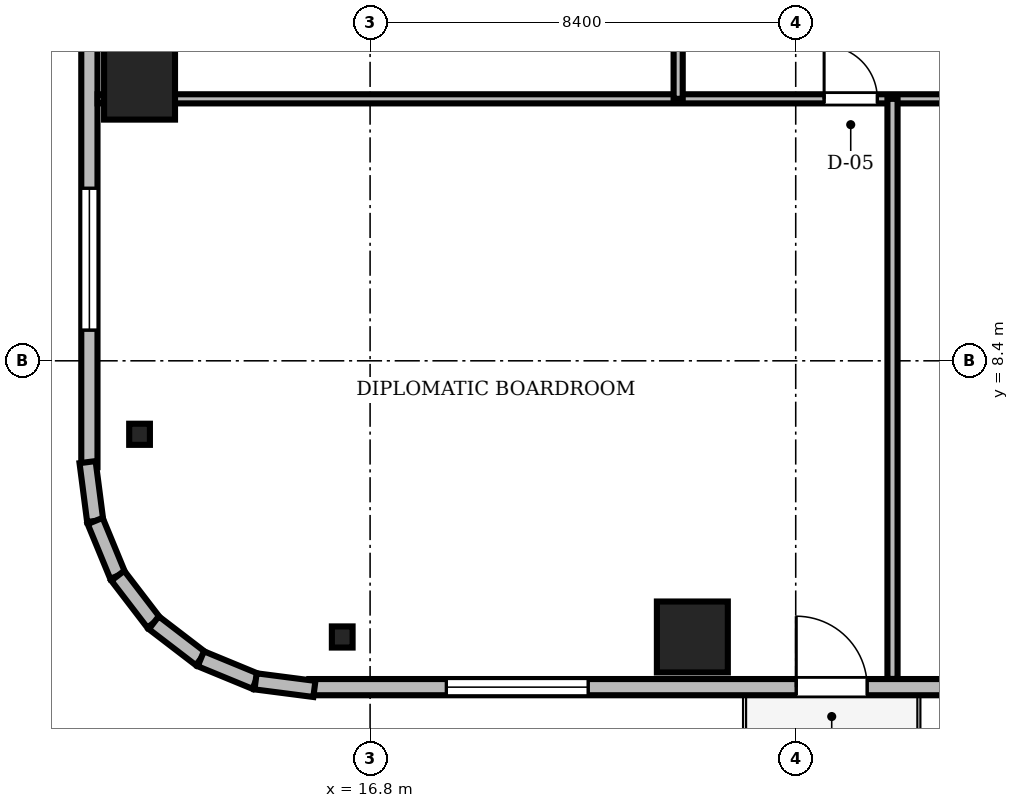
"""IFC4 building model, lengths in metres.
Left out: names, types, materials, properties, quantities, classifications, styles, units other than length and angle.
Written with IfcOpenShell. Run it as: python <this file> out.ifc"""

import sys

from ifc_helpers import new_model, si_unit, direction, frame, frame_2d, origin, origin_2d, place, context, subcontext, project, spatial, rectangle, i_section, extrude, source, transform, mapped, element, fill, save


model = new_model("IFC4")
c1 = context("Model", 3, precision=1e-05, world=origin(), true_north=direction((0.0, 1.0)))
c2 = subcontext(c1, "Body", "Model", "MODEL_VIEW")
j1 = project(units=[si_unit("LENGTHUNIT", "METRE"), si_unit("PLANEANGLEUNIT", "RADIAN")], contexts=[c1])
p1 = place(None, origin())
s1 = spatial("IfcSite", under=j1, at=p1, CompositionType="ELEMENT")
p2 = place(p1, origin())
s2 = spatial("IfcBuilding", under=s1, at=p2, CompositionType="ELEMENT")
p3 = place(p2, frame((0.0, 0.0, 233.55)))
s3 = spatial("IfcBuildingStorey", under=s2, at=p3, CompositionType="ELEMENT", Elevation=233.55)
m1 = source(origin(), c2, "Body", "SweptSolid", [
    extrude(rectangle(XDim=1.4, YDim=1.4, at=origin_2d()), origin(), (0.0, 0.0, 1.0), 3.1),
])
for number, where, z_axis, x_axis in (
    (1, (23.16, 2.95, 0.0), (0.0, 0.0, 1.0), (1.0, 0.0, 0.0)),
    (2, (12.25, 13.86, 0.0), (0.0, 0.0, 1.0), (1.0, 0.0, 0.0)),
):
    element("IfcColumn", number, at=place(p3, frame(where, z_axis=z_axis, x_axis=x_axis)), inside=s3, PredefinedType="COLUMN", context=c2, shape_type="MappedRepresentation", body=[
        mapped(m1, transform((0.0, 0.0, 0.0), scale=1.0)),
    ])
m2 = source(origin(), c2, "Body", "SweptSolid", [
    extrude(i_section(OverallWidth=0.409, OverallDepth=0.417, WebThickness=0.021, FlangeThickness=0.033, FilletRadius=0.015, at=origin_2d()), origin(), (0.0, 0.0, 1.0), 3.1),
])
for number, where, z_axis, x_axis in (
    (3, (16.25, 2.95, 0.0), (0.0, 0.0, 1.0), (1.0, 0.0, 0.0)),
    (4, (12.25, 6.95, 0.0), (0.0, 0.0, 1.0), (1.0, 0.0, 0.0)),
):
    element("IfcColumn", number, at=place(p3, frame(where, z_axis=z_axis, x_axis=x_axis)), inside=s3, PredefinedType="COLUMN", context=c2, shape_type="MappedRepresentation", body=[
        mapped(m2, transform((0.0, 0.0, 0.0), scale=1.0)),
    ])
m3 = source(origin(), c2, "Body", "SweptSolid", [
    extrude(rectangle(XDim=15.6, YDim=0.32, at=frame_2d((7.8, 0.0))), origin(), (0.0, 0.0, 1.0), 3.1),
])
p4 = place(p3, frame((15.6, 1.96, 0.0), z_axis=(0.0, 0.0, 1.0), x_axis=(1.0, 0.0, 0.0)))
e5 = element("IfcWall", 5, at=p4, inside=s3, PredefinedType="SOLIDWALL", context=c2, shape_type="MappedRepresentation", body=[
    mapped(m3, transform((0.0, 0.0, 0.0), scale=1.0)),
])
m4 = source(origin(), c2, "Body", "SweptSolid", [
    extrude(rectangle(XDim=1.4, YDim=2.3, at=frame_2d((0.7, 1.15))), frame((0.0, 0.17, 0.0), z_axis=(0.0, -1.0, 0.0), x_axis=(1.0, 0.0, 0.0)), (0.0, 0.0, 1.0), 0.34),
])
p5 = place(p4, frame((9.61, 0.0, 0.0)))
e6 = element("IfcOpeningElement", 6, at=p5, cuts=e5, PredefinedType="OPENING", context=c2, shape_type="MappedRepresentation", body=[
    mapped(m4, transform((0.0, 0.0, 0.0), scale=1.0)),
])
m5 = source(origin(), c2, "Body", "SweptSolid", [
    extrude(rectangle(XDim=2.8, YDim=2.4, at=frame_2d((1.4, 1.2))), frame((0.0, 0.17, 0.0), z_axis=(0.0, -1.0, 0.0), x_axis=(1.0, 0.0, 0.0)), (0.0, 0.0, 1.0), 0.34),
])
p6 = place(p4, frame((2.705, 0.0, 0.44)))
e7 = element("IfcOpeningElement", 7, at=p6, cuts=e5, PredefinedType="OPENING", context=c2, shape_type="MappedRepresentation", body=[
    mapped(m5, transform((0.0, 0.0, 0.0), scale=1.0)),
])
p7 = place(p3, frame((11.26, 21.9, 0.0), z_axis=(0.0, 0.0, 1.0), x_axis=(0.0, -1.0, 0.0)))
e8 = element("IfcWall", 8, at=p7, inside=s3, PredefinedType="SOLIDWALL", context=c2, shape_type="MappedRepresentation", body=[
    mapped(m3, transform((0.0, 0.0, 0.0), scale=1.0)),
])
p8 = place(p7, frame((10.095, 0.0, 0.44)))
e9 = element("IfcOpeningElement", 9, at=p8, cuts=e8, PredefinedType="OPENING", context=c2, shape_type="MappedRepresentation", body=[
    mapped(m5, transform((0.0, 0.0, 0.0), scale=1.0)),
])
m6 = source(origin(), c2, "Body", "SweptSolid", [
    extrude(rectangle(XDim=1.171, YDim=0.32, at=frame_2d((0.585, 0.0))), origin(), (0.0, 0.0, 1.0), 3.1),
])
p9 = place(p3, frame((11.224, 6.401, 0.0), z_axis=(0.0, 0.0, 1.0), x_axis=(0.128269133229, -0.991739395941, 0.0)))
e10 = element("IfcWall", 10, at=p9, inside=s3, PredefinedType="SOLIDWALL", context=c2, shape_type="MappedRepresentation", body=[
    mapped(m6, transform((0.0, 0.0, 0.0), scale=1.0)),
])
m7 = source(origin(), c2, "Body", "SweptSolid", [
    extrude(rectangle(XDim=1.169, YDim=0.32, at=frame_2d((0.584, 0.0))), origin(), (0.0, 0.0, 1.0), 3.1),
])
for number, where, z_axis, x_axis in (
    (11, (11.375, 5.24, 0.0), (0.0, 0.0, 1.0), (0.381, -0.925, 0.0)),
    (12, (11.82, 4.159, 0.0), (0.0, 0.0, 1.0), (0.608, -0.794, 0.0)),
):
    element("IfcWall", number, at=place(p3, frame(where, z_axis=z_axis, x_axis=x_axis)), inside=s3, PredefinedType="SOLIDWALL", context=c2, shape_type="MappedRepresentation", body=[
        mapped(m7, transform((0.0, 0.0, 0.0), scale=1.0)),
    ])
m8 = source(origin(), c2, "Body", "SweptSolid", [
    extrude(rectangle(XDim=1.169, YDim=0.32, at=frame_2d((0.584, 0.0))), origin(), (0.0, 0.0, 1.0), 3.1),
])
p10 = place(p3, frame((12.531, 3.231, 0.0), z_axis=(0.0, 0.0, 1.0), x_axis=(0.793663520347, -0.608356981114, 0.0)))
e13 = element("IfcWall", 13, at=p10, inside=s3, PredefinedType="SOLIDWALL", context=c2, shape_type="MappedRepresentation", body=[
    mapped(m8, transform((0.0, 0.0, 0.0), scale=1.0)),
])
m9 = source(origin(), c2, "Body", "SweptSolid", [
    extrude(rectangle(XDim=1.169, YDim=0.32, at=frame_2d((0.585, 0.0))), origin(), (0.0, 0.0, 1.0), 3.1),
])
p11 = place(p3, frame((13.459, 2.52, 0.0), z_axis=(0.0, 0.0, 1.0), x_axis=(0.924479075121, -0.381232789334, 0.0)))
e14 = element("IfcWall", 14, at=p11, inside=s3, PredefinedType="SOLIDWALL", context=c2, shape_type="MappedRepresentation", body=[
    mapped(m9, transform((0.0, 0.0, 0.0), scale=1.0)),
])
m10 = source(origin(), c2, "Body", "SweptSolid", [
    extrude(rectangle(XDim=1.17, YDim=0.32, at=frame_2d((0.585, 0.0))), origin(), (0.0, 0.0, 1.0), 3.1),
])
p12 = place(p3, frame((14.54, 2.074, 0.0), z_axis=(0.0, 0.0, 1.0), x_axis=(0.991762485493, -0.128090485085, 0.0)))
e15 = element("IfcWall", 15, at=p12, inside=s3, PredefinedType="SOLIDWALL", context=c2, shape_type="MappedRepresentation", body=[
    mapped(m10, transform((0.0, 0.0, 0.0), scale=1.0)),
])
m11 = source(origin(), c2, "Body", "SweptSolid", [
    extrude(rectangle(XDim=46.156, YDim=0.18, at=frame_2d((23.078, 0.0))), origin(), (0.0, 0.0, 1.0), 2.376),
])
p13 = place(p3, frame((11.422, 13.57, 0.0), z_axis=(0.0, 0.0, 1.0), x_axis=(1.0, 0.0, 0.0)))
e16 = element("IfcWall", 16, at=p13, inside=s3, PredefinedType="PARTITIONING", context=c2, shape_type="MappedRepresentation", body=[
    mapped(m11, transform((0.0, 0.0, 0.0), scale=1.0)),
])
m12 = source(origin(), c2, "Body", "SweptSolid", [
    extrude(rectangle(XDim=1.05, YDim=2.2, at=frame_2d((0.525, 1.1))), frame((0.0, 0.1, 0.0), z_axis=(0.0, -1.0, 0.0), x_axis=(1.0, 0.0, 0.0)), (0.0, 0.0, 1.0), 0.2),
])
p14 = place(p13, frame((14.338, 0.0, 0.0)))
e17 = element("IfcOpeningElement", 17, at=p14, cuts=e16, PredefinedType="OPENING", context=c2, shape_type="MappedRepresentation", body=[
    mapped(m12, transform((0.0, 0.0, 0.0), scale=1.0)),
])
p15 = place(p13, frame((17.059, 0.0, 0.0)))
e18 = element("IfcOpeningElement", 18, at=p15, cuts=e16, PredefinedType="OPENING", context=c2, shape_type="MappedRepresentation", body=[
    mapped(m12, transform((0.0, 0.0, 0.0), scale=1.0)),
])
p16 = place(p13, frame((21.772, 0.0, 0.0)))
e19 = element("IfcOpeningElement", 19, at=p16, cuts=e16, PredefinedType="OPENING", context=c2, shape_type="MappedRepresentation", body=[
    mapped(m12, transform((0.0, 0.0, 0.0), scale=1.0)),
])
p17 = place(p13, frame((27.414, 0.0, 0.0)))
e20 = element("IfcOpeningElement", 20, at=p17, cuts=e16, PredefinedType="OPENING", context=c2, shape_type="MappedRepresentation", body=[
    mapped(m12, transform((0.0, 0.0, 0.0), scale=1.0)),
])
p18 = place(p13, frame((33.057, 0.0, 0.0)))
e21 = element("IfcOpeningElement", 21, at=p18, cuts=e16, PredefinedType="OPENING", context=c2, shape_type="MappedRepresentation", body=[
    mapped(m12, transform((0.0, 0.0, 0.0), scale=1.0)),
])
p19 = place(p13, frame((37.498, 0.0, 0.0)))
e22 = element("IfcOpeningElement", 22, at=p19, cuts=e16, PredefinedType="OPENING", context=c2, shape_type="MappedRepresentation", body=[
    mapped(m12, transform((0.0, 0.0, 0.0), scale=1.0)),
])
m13 = source(origin(), c2, "Body", "SweptSolid", [
    extrude(rectangle(XDim=14.98, YDim=0.18, at=frame_2d((7.49, 0.0))), origin(), (0.0, 0.0, 1.0), 2.542),
])
p20 = place(p3, frame((22.88, 13.57, 0.0), z_axis=(0.0, 0.0, 1.0), x_axis=(0.0, 1.0, 0.0)))
e23 = element("IfcWall", 23, at=p20, inside=s3, PredefinedType="PARTITIONING", context=c2, shape_type="MappedRepresentation", body=[
    mapped(m13, transform((0.0, 0.0, 0.0), scale=1.0)),
])
m14 = source(origin(), c2, "Body", "SweptSolid", [
    extrude(rectangle(XDim=11.448, YDim=0.2, at=frame_2d((5.724, 0.0))), origin(), (0.0, 0.0, 1.0), 2.376),
])
p21 = place(p3, frame((27.11, 2.122, 0.0), z_axis=(0.0, 0.0, 1.0), x_axis=(0.0, 1.0, 0.0)))
e24 = element("IfcWall", 24, at=p21, inside=s3, PredefinedType="PARTITIONING", context=c2, shape_type="MappedRepresentation", body=[
    mapped(m14, transform((0.0, 0.0, 0.0), scale=1.0)),
])
m15 = source(origin(), c2, "Body", "SweptSolid", [
    extrude(rectangle(XDim=1.4, YDim=2.3, at=frame_2d((0.7, 1.15))), frame((0.0, 0.025, 0.0), z_axis=(0.0, -1.0, 0.0), x_axis=(1.0, 0.0, 0.0)), (0.0, 0.0, 1.0), 0.05),
])
p22 = place(p5, frame((1.4, 0.0, 0.0), z_axis=(0.0, 0.0, 1.0), x_axis=(-1.0, 0.0, 0.0)))
e25 = element("IfcDoor", 25, at=p22, inside=s3, OperationType="DOUBLE_DOOR_SLIDING", PredefinedType="DOOR", context=c2, shape_type="MappedRepresentation", body=[
    mapped(m15, transform((0.0, 0.0, 0.0), scale=1.0)),
])
fill(e6, e25)
m16 = source(origin(), c2, "Body", "SweptSolid", [
    extrude(rectangle(XDim=2.8, YDim=2.4, at=frame_2d((1.4, 1.2))), frame((0.0, 0.03, 0.0), z_axis=(0.0, -1.0, 0.0), x_axis=(1.0, 0.0, 0.0)), (0.0, 0.0, 1.0), 0.06),
])
p23 = place(p6, origin())
e26 = element("IfcWindow", 26, at=p23, inside=s3, PartitioningType="SINGLE_PANEL", PredefinedType="WINDOW", context=c2, shape_type="MappedRepresentation", body=[
    mapped(m16, transform((0.0, 0.0, 0.0), scale=1.0)),
])
fill(e7, e26)
p24 = place(p8, origin())
e27 = element("IfcWindow", 27, at=p24, inside=s3, PartitioningType="SINGLE_PANEL", PredefinedType="WINDOW", context=c2, shape_type="MappedRepresentation", body=[
    mapped(m16, transform((0.0, 0.0, 0.0), scale=1.0)),
])
fill(e9, e27)
m17 = source(origin(), c2, "Body", "SweptSolid", [
    extrude(rectangle(XDim=1.05, YDim=2.2, at=frame_2d((0.525, 1.1))), frame((0.0, 0.025, 0.0), z_axis=(0.0, -1.0, 0.0), x_axis=(1.0, 0.0, 0.0)), (0.0, 0.0, 1.0), 0.05),
])
p25 = place(p14, origin())
e28 = element("IfcDoor", 28, at=p25, inside=s3, OperationType="SINGLE_SWING_LEFT", PredefinedType="DOOR", context=c2, shape_type="MappedRepresentation", body=[
    mapped(m17, transform((0.0, 0.0, 0.0), scale=1.0)),
])
fill(e17, e28)
save(model, sys.argv[1])
